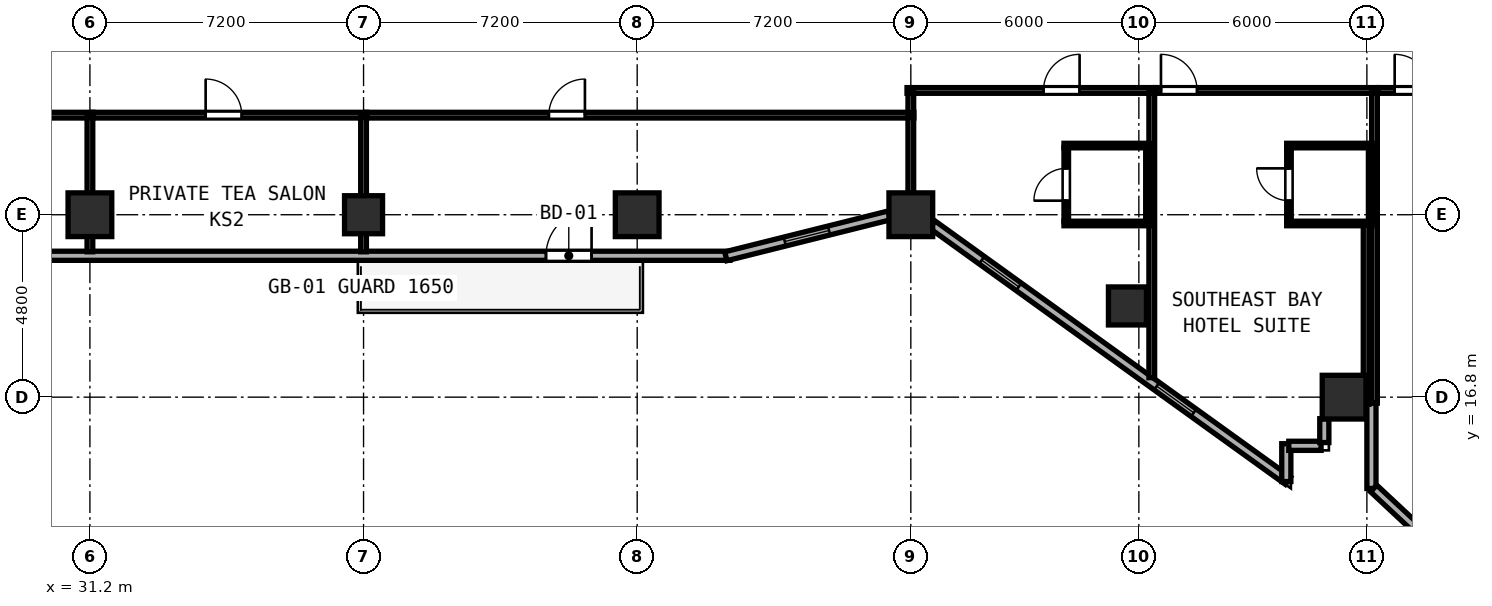
"""IFC4 building model, lengths in metres.
Left out: names, types, materials, properties, quantities, classifications, styles, units other than length and angle.
Written with IfcOpenShell. Run it as: python <this file> out.ifc"""

import sys

from ifc_helpers import new_model, si_unit, direction, frame, frame_2d, origin, origin_2d, place, context, subcontext, project, spatial, rectangle, hollow_rectangle, extrude, element, fill, save


model = new_model("IFC4")
c1 = context("Model", 3, precision=1e-05, world=origin(), true_north=direction((0.0, 1.0)))
c2 = subcontext(c1, "Body", "Model", "MODEL_VIEW")
j1 = project(units=[si_unit("LENGTHUNIT", "METRE"), si_unit("PLANEANGLEUNIT", "RADIAN")], contexts=[c1])
p1 = place(None, origin())
s1 = spatial("IfcSite", under=j1, at=p1, CompositionType="ELEMENT")
p2 = place(p1, origin())
s2 = spatial("IfcBuilding", under=s1, at=p2, CompositionType="ELEMENT")
p3 = place(p2, frame((0.0, 0.0, 70.4)))
s3 = spatial("IfcBuildingStorey", under=s2, at=p3, CompositionType="ELEMENT", Elevation=70.4)
for number, where, z_axis, x_axis in (
    (1, (52.8, 21.6, 0.0), (0.0, 0.0, 1.0), (1.0, 0.0, 0.0)),
    (2, (31.2, 21.6, 0.0), (0.0, 0.0, 1.0), (1.0, 0.0, 0.0)),
    (3, (45.6, 21.6, 0.0), (0.0, 0.0, 1.0), (1.0, 0.0, 0.0)),
    (4, (64.2, 16.8, 0.0), (0.0, 0.0, 1.0), (1.0, 0.0, 0.0)),
):
    element("IfcColumn", number, at=place(p3, frame(where, z_axis=z_axis, x_axis=x_axis)), inside=s3, PredefinedType="COLUMN", context=c2, shape_type="SweptSolid", body=[
        extrude(hollow_rectangle(XDim=1.15, YDim=1.15, WallThickness=0.042, at=origin_2d()), origin(), (0.0, 0.0, 1.0), 3.8),
    ])
for number, where, z_axis, x_axis in (
    (5, (38.4, 21.6, 0.0), (0.0, 0.0, 1.0), (1.0, 0.0, 0.0)),
    (6, (58.5, 19.2, 0.0), (0.0, 0.0, 1.0), (1.0, 0.0, 0.0)),
):
    element("IfcColumn", number, at=place(p3, frame(where, z_axis=z_axis, x_axis=x_axis)), inside=s3, PredefinedType="COLUMN", context=c2, shape_type="SweptSolid", body=[
        extrude(hollow_rectangle(XDim=1.0, YDim=1.0, WallThickness=0.038, at=origin_2d()), origin(), (0.0, 0.0, 1.0), 3.8),
    ])
p4 = place(p3, frame((28.76, 20.52, 0.0), z_axis=(0.0, 0.0, 1.0), x_axis=(1.0, 0.0, 0.0)))
e7 = element("IfcWall", 7, at=p4, inside=s3, PredefinedType="SOLIDWALL", context=c2, shape_type="SweptSolid", body=[
    extrude(rectangle(XDim=19.281, YDim=0.24, at=frame_2d((9.64, 0.0))), origin(), (0.0, 0.0, 1.0), 3.6),
])
p5 = place(p4, frame((15.64, 0.0, 0.0), z_axis=(0.0, 0.0, 1.0), x_axis=(-1.0, 0.0, 0.0)))
e8 = element("IfcOpeningElement", 8, at=p5, cuts=e7, PredefinedType="OPENING", context=c2, shape_type="SweptSolid", body=[
    extrude(rectangle(XDim=1.2, YDim=2.15, at=frame_2d((0.6, 1.075))), frame((0.0, 0.13, 0.0), z_axis=(0.0, -1.0, 0.0), x_axis=(1.0, 0.0, 0.0)), (0.0, 0.0, 1.0), 0.26),
])
p6 = place(p3, frame((47.932, 20.507, 0.0), z_axis=(0.0, 0.0, 1.0), x_axis=(0.970145739396, 0.242522667667, 0.0)))
e9 = element("IfcWall", 9, at=p6, inside=s3, PredefinedType="SOLIDWALL", context=c2, shape_type="SweptSolid", body=[
    extrude(rectangle(XDim=4.433, YDim=0.24, at=frame_2d((2.217, 0.0))), origin(), (0.0, 0.0, 1.0), 3.097),
])
p7 = place(p6, frame((1.6, 0.0, 0.85)))
e10 = element("IfcOpeningElement", 10, at=p7, cuts=e9, PredefinedType="OPENING", context=c2, shape_type="SweptSolid", body=[
    extrude(rectangle(XDim=1.2, YDim=1.85, at=frame_2d((0.6, 0.925))), frame((0.0, 0.13, 0.0), z_axis=(0.0, -1.0, 0.0), x_axis=(1.0, 0.0, 0.0)), (0.0, 0.0, 1.0), 0.26),
])
p8 = place(p3, frame((53.367, 21.34, 0.0), z_axis=(0.0, 0.0, 1.0), x_axis=(0.811543176492, -0.58429245476, 0.0)))
e11 = element("IfcWall", 11, at=p8, inside=s3, PredefinedType="SOLIDWALL", context=c2, shape_type="SweptSolid", body=[
    extrude(rectangle(XDim=11.531, YDim=0.24, at=frame_2d((5.765, 0.0))), origin(), (0.0, 0.0, 1.0), 3.097),
])
p9 = place(p8, frame((1.6, 0.0, 0.85)))
e12 = element("IfcOpeningElement", 12, at=p9, cuts=e11, PredefinedType="OPENING", context=c2, shape_type="SweptSolid", body=[
    extrude(rectangle(XDim=1.2, YDim=1.85, at=frame_2d((0.6, 0.925))), frame((0.0, 0.13, 0.0), z_axis=(0.0, -1.0, 0.0), x_axis=(1.0, 0.0, 0.0)), (0.0, 0.0, 1.0), 0.26),
])
p10 = place(p8, frame((7.273, 0.0, 0.85)))
e13 = element("IfcOpeningElement", 13, at=p10, cuts=e11, PredefinedType="OPENING", context=c2, shape_type="SweptSolid", body=[
    extrude(rectangle(XDim=1.2, YDim=1.85, at=frame_2d((0.6, 0.925))), frame((0.0, 0.13, 0.0), z_axis=(0.0, -1.0, 0.0), x_axis=(1.0, 0.0, 0.0)), (0.0, 0.0, 1.0), 0.26),
])
p11 = place(p3, frame((62.68, 14.579, 0.0), z_axis=(0.0, 0.0, 1.0), x_axis=(0.0, 1.0, 0.0)))
e14 = element("IfcWall", 14, at=p11, inside=s3, PredefinedType="SOLIDWALL", context=c2, shape_type="SweptSolid", body=[
    extrude(rectangle(XDim=0.996, YDim=0.24, at=frame_2d((0.498, 0.0))), origin(), (0.0, 0.0, 1.0), 3.6),
])
p12 = place(p3, frame((62.745, 15.52, 0.0), z_axis=(0.0, 0.0, 1.0), x_axis=(1.0, 0.0, 0.0)))
e15 = element("IfcWall", 15, at=p12, inside=s3, PredefinedType="SOLIDWALL", context=c2, shape_type="SweptSolid", body=[
    extrude(rectangle(XDim=0.85, YDim=0.24, at=frame_2d((0.425, 0.0))), origin(), (0.0, 0.0, 1.0), 3.6),
])
p13 = place(p3, frame((63.68, 15.605, 0.0), z_axis=(0.0, 0.0, 1.0), x_axis=(0.0, 1.0, 0.0)))
e16 = element("IfcWall", 16, at=p13, inside=s3, PredefinedType="SOLIDWALL", context=c2, shape_type="SweptSolid", body=[
    extrude(rectangle(XDim=0.628, YDim=0.24, at=frame_2d((0.314, 0.0))), origin(), (0.0, 0.0, 1.0), 3.6),
])
p14 = place(p3, frame((64.92, 16.64, 0.0), z_axis=(0.0, 0.0, 1.0), x_axis=(0.0, -1.0, 0.0)))
e17 = element("IfcWall", 17, at=p14, inside=s3, PredefinedType="SOLIDWALL", context=c2, shape_type="SweptSolid", body=[
    extrude(rectangle(XDim=2.243, YDim=0.24, at=frame_2d((1.121, 0.0))), origin(), (0.0, 0.0, 1.0), 3.6),
])
p15 = place(p3, frame((64.979, 14.397, 0.0), z_axis=(0.0, 0.0, 1.0), x_axis=(0.731053894258, -0.682319722484, 0.0)))
e18 = element("IfcWall", 18, at=p15, inside=s3, PredefinedType="SOLIDWALL", context=c2, shape_type="SweptSolid", body=[
    extrude(rectangle(XDim=11.818, YDim=0.24, at=frame_2d((5.909, 0.0))), origin(), (0.0, 0.0, 1.0), 3.6),
])
p16 = place(p15, frame((1.6, 0.0, 0.85)))
e19 = element("IfcOpeningElement", 19, at=p16, cuts=e18, PredefinedType="OPENING", context=c2, shape_type="SweptSolid", body=[
    extrude(rectangle(XDim=1.2, YDim=1.85, at=frame_2d((0.6, 0.925))), frame((0.0, 0.13, 0.0), z_axis=(0.0, -1.0, 0.0), x_axis=(1.0, 0.0, 0.0)), (0.0, 0.0, 1.0), 0.26),
])
p17 = place(p15, frame((7.0, 0.0, 0.85)))
e20 = element("IfcOpeningElement", 20, at=p17, cuts=e18, PredefinedType="OPENING", context=c2, shape_type="SweptSolid", body=[
    extrude(rectangle(XDim=1.2, YDim=1.85, at=frame_2d((0.6, 0.925))), frame((0.0, 0.13, 0.0), z_axis=(0.0, -1.0, 0.0), x_axis=(1.0, 0.0, 0.0)), (0.0, 0.0, 1.0), 0.26),
])
p18 = place(p3, frame((23.92, 24.22, 0.0), z_axis=(0.0, 0.0, 1.0), x_axis=(1.0, 0.0, 0.0)))
e21 = element("IfcWall", 21, at=p18, inside=s3, PredefinedType="PARTITIONING", context=c2, shape_type="SweptSolid", body=[
    extrude(rectangle(XDim=7.36, YDim=0.15, at=frame_2d((3.68, 0.0))), origin(), (0.0, 0.0, 1.0), 3.6),
])
p19 = place(p18, frame((5.845, 0.0, 0.0), z_axis=(0.0, 0.0, 1.0), x_axis=(-1.0, 0.0, 0.0)))
e22 = element("IfcOpeningElement", 22, at=p19, cuts=e21, PredefinedType="OPENING", context=c2, shape_type="SweptSolid", body=[
    extrude(rectangle(XDim=0.95, YDim=2.12, at=frame_2d((0.475, 1.06))), frame((0.0, 0.085, 0.0), z_axis=(0.0, -1.0, 0.0), x_axis=(1.0, 0.0, 0.0)), (0.0, 0.0, 1.0), 0.17),
])
p20 = place(p3, frame((31.2, 20.625, 0.0), z_axis=(0.0, 0.0, 1.0), x_axis=(0.0, 1.0, 0.0)))
e23 = element("IfcWall", 23, at=p20, inside=s3, PredefinedType="PARTITIONING", context=c2, shape_type="SweptSolid", body=[
    extrude(rectangle(XDim=3.535, YDim=0.15, at=frame_2d((1.768, 0.0))), origin(), (0.0, 0.0, 1.0), 2.985),
])
p21 = place(p3, frame((31.282, 24.22, 0.0), z_axis=(0.0, 0.0, 1.0), x_axis=(1.0, 0.0, 0.0)))
e24 = element("IfcWall", 24, at=p21, inside=s3, PredefinedType="PARTITIONING", context=c2, shape_type="SweptSolid", body=[
    extrude(rectangle(XDim=7.198, YDim=0.15, at=frame_2d((3.599, 0.0))), origin(), (0.0, 0.0, 1.0), 3.6),
])
p22 = place(p21, frame((3.913, 0.0, 0.0), z_axis=(0.0, 0.0, 1.0), x_axis=(-1.0, 0.0, 0.0)))
e25 = element("IfcOpeningElement", 25, at=p22, cuts=e24, PredefinedType="OPENING", context=c2, shape_type="SweptSolid", body=[
    extrude(rectangle(XDim=0.95, YDim=2.12, at=frame_2d((0.475, 1.06))), frame((0.0, 0.085, 0.0), z_axis=(0.0, -1.0, 0.0), x_axis=(1.0, 0.0, 0.0)), (0.0, 0.0, 1.0), 0.17),
])
p23 = place(p3, frame((38.4, 20.625, 0.0), z_axis=(0.0, 0.0, 1.0), x_axis=(0.0, 1.0, 0.0)))
e26 = element("IfcWall", 26, at=p23, inside=s3, PredefinedType="PARTITIONING", context=c2, shape_type="SweptSolid", body=[
    extrude(rectangle(XDim=3.535, YDim=0.15, at=frame_2d((1.768, 0.0))), origin(), (0.0, 0.0, 1.0), 2.985),
])
p24 = place(p3, frame((38.482, 24.22, 0.0), z_axis=(0.0, 0.0, 1.0), x_axis=(1.0, 0.0, 0.0)))
e27 = element("IfcWall", 27, at=p24, inside=s3, PredefinedType="PARTITIONING", context=c2, shape_type="SweptSolid", body=[
    extrude(rectangle(XDim=14.398, YDim=0.15, at=frame_2d((7.199, 0.0))), origin(), (0.0, 0.0, 1.0), 3.6),
])
p25 = place(p24, frame((5.743, 0.0, 0.0), z_axis=(0.0, 0.0, 1.0), x_axis=(-1.0, 0.0, 0.0)))
e28 = element("IfcOpeningElement", 28, at=p25, cuts=e27, PredefinedType="OPENING", context=c2, shape_type="SweptSolid", body=[
    extrude(rectangle(XDim=0.95, YDim=2.12, at=frame_2d((0.475, 1.06))), frame((0.0, 0.085, 0.0), z_axis=(0.0, -1.0, 0.0), x_axis=(1.0, 0.0, 0.0)), (0.0, 0.0, 1.0), 0.17),
])
p26 = place(p3, frame((52.8, 21.819, 0.0), z_axis=(0.0, 0.0, 1.0), x_axis=(0.0, 1.0, 0.0)))
e29 = element("IfcWall", 29, at=p26, inside=s3, PredefinedType="PARTITIONING", context=c2, shape_type="SweptSolid", body=[
    extrude(rectangle(XDim=2.341, YDim=0.15, at=frame_2d((1.171, 0.0))), origin(), (0.0, 0.0, 1.0), 3.097),
])
p27 = place(p3, frame((52.7, 24.87, 0.0), z_axis=(0.0, 0.0, 1.0), x_axis=(1.0, 0.0, 0.0)))
e30 = element("IfcWall", 30, at=p27, inside=s3, PredefinedType="PARTITIONING", context=c2, shape_type="SweptSolid", body=[
    extrude(rectangle(XDim=6.54, YDim=0.15, at=frame_2d((3.27, 0.0))), origin(), (0.0, 0.0, 1.0), 3.185),
])
p28 = place(p27, frame((4.541, 0.0, 0.0), z_axis=(0.0, 0.0, 1.0), x_axis=(-1.0, 0.0, 0.0)))
e31 = element("IfcOpeningElement", 31, at=p28, cuts=e30, PredefinedType="OPENING", context=c2, shape_type="SweptSolid", body=[
    extrude(rectangle(XDim=0.95, YDim=2.18, at=frame_2d((0.475, 1.09))), frame((0.0, 0.085, 0.0), z_axis=(0.0, -1.0, 0.0), x_axis=(1.0, 0.0, 0.0)), (0.0, 0.0, 1.0), 0.17),
])
p29 = place(p3, frame((52.8, 24.28, 0.0), z_axis=(0.0, 0.0, 1.0), x_axis=(0.0, 1.0, 0.0)))
e32 = element("IfcWall", 32, at=p29, inside=s3, PredefinedType="PARTITIONING", context=c2, shape_type="SweptSolid", body=[
    extrude(rectangle(XDim=0.53, YDim=0.15, at=frame_2d((0.265, 0.0))), origin(), (0.0, 0.0, 1.0), 3.097),
])
p30 = place(p3, frame((59.14, 17.312, 0.0), z_axis=(0.0, 0.0, 1.0), x_axis=(0.0, 1.0, 0.0)))
e33 = element("IfcWall", 33, at=p30, inside=s3, PredefinedType="PARTITIONING", context=c2, shape_type="SweptSolid", body=[
    extrude(rectangle(XDim=7.498, YDim=0.15, at=frame_2d((3.749, 0.0))), origin(), (0.0, 0.0, 1.0), 3.6),
])
for number, where, z_axis, x_axis in (
    (34, (56.83, 23.42, 0.0), (0.0, 0.0, 1.0), (1.0, 0.0, 0.0)),
    (35, (56.83, 21.37, 0.0), (0.0, 0.0, 1.0), (1.0, 0.0, 0.0)),
):
    element("IfcWall", number, at=place(p3, frame(where, z_axis=z_axis, x_axis=x_axis)), inside=s3, PredefinedType="PARTITIONING", context=c2, shape_type="SweptSolid", body=[
        extrude(rectangle(XDim=2.25, YDim=0.12, at=frame_2d((1.125, 0.0))), origin(), (0.0, 0.0, 1.0), 3.6),
    ])
p31 = place(p3, frame((56.89, 21.415, 0.0), z_axis=(0.0, 0.0, 1.0), x_axis=(0.0, 1.0, 0.0)))
e36 = element("IfcWall", 36, at=p31, inside=s3, PredefinedType="PARTITIONING", context=c2, shape_type="SweptSolid", body=[
    extrude(rectangle(XDim=1.96, YDim=0.12, at=frame_2d((0.98, 0.0))), origin(), (0.0, 0.0, 1.0), 3.6),
])
p32 = place(p31, frame((1.405, 0.0, 0.0), z_axis=(0.0, 0.0, 1.0), x_axis=(-1.0, 0.0, 0.0)))
e37 = element("IfcOpeningElement", 37, at=p32, cuts=e36, PredefinedType="OPENING", context=c2, shape_type="SweptSolid", body=[
    extrude(rectangle(XDim=0.85, YDim=2.1, at=frame_2d((0.425, 1.05))), frame((0.0, 0.07, 0.0), z_axis=(0.0, -1.0, 0.0), x_axis=(1.0, 0.0, 0.0)), (0.0, 0.0, 1.0), 0.14),
])
p33 = place(p3, frame((59.04, 21.415, 0.0), z_axis=(0.0, 0.0, 1.0), x_axis=(0.0, 1.0, 0.0)))
e38 = element("IfcWall", 38, at=p33, inside=s3, PredefinedType="PARTITIONING", context=c2, shape_type="SweptSolid", body=[
    extrude(rectangle(XDim=1.96, YDim=0.12, at=frame_2d((0.98, 0.0))), origin(), (0.0, 0.0, 1.0), 3.6),
])
p34 = place(p3, frame((59.242, 24.87, 0.0), z_axis=(0.0, 0.0, 1.0), x_axis=(1.0, 0.0, 0.0)))
e39 = element("IfcWall", 39, at=p34, inside=s3, PredefinedType="PARTITIONING", context=c2, shape_type="SweptSolid", body=[
    extrude(rectangle(XDim=5.858, YDim=0.15, at=frame_2d((2.929, 0.0))), origin(), (0.0, 0.0, 1.0), 3.185),
])
p35 = place(p34, frame((1.09, 0.0, 0.0), z_axis=(0.0, 0.0, 1.0), x_axis=(-1.0, 0.0, 0.0)))
e40 = element("IfcOpeningElement", 40, at=p35, cuts=e39, PredefinedType="OPENING", context=c2, shape_type="SweptSolid", body=[
    extrude(rectangle(XDim=0.95, YDim=2.18, at=frame_2d((0.475, 1.09))), frame((0.0, 0.085, 0.0), z_axis=(0.0, -1.0, 0.0), x_axis=(1.0, 0.0, 0.0)), (0.0, 0.0, 1.0), 0.17),
])
p36 = place(p3, frame((65.0, 16.642, 0.0), z_axis=(0.0, 0.0, 1.0), x_axis=(0.0, 1.0, 0.0)))
e41 = element("IfcWall", 41, at=p36, inside=s3, PredefinedType="PARTITIONING", context=c2, shape_type="SweptSolid", body=[
    extrude(rectangle(XDim=8.168, YDim=0.15, at=frame_2d((4.084, 0.0))), origin(), (0.0, 0.0, 1.0), 3.6),
])
for number, where, z_axis, x_axis in (
    (42, (62.69, 23.42, 0.0), (0.0, 0.0, 1.0), (1.0, 0.0, 0.0)),
    (43, (62.69, 21.37, 0.0), (0.0, 0.0, 1.0), (1.0, 0.0, 0.0)),
):
    element("IfcWall", number, at=place(p3, frame(where, z_axis=z_axis, x_axis=x_axis)), inside=s3, PredefinedType="PARTITIONING", context=c2, shape_type="SweptSolid", body=[
        extrude(rectangle(XDim=2.25, YDim=0.12, at=frame_2d((1.125, 0.0))), origin(), (0.0, 0.0, 1.0), 3.6),
    ])
p37 = place(p3, frame((62.75, 21.415, 0.0), z_axis=(0.0, 0.0, 1.0), x_axis=(0.0, 1.0, 0.0)))
e44 = element("IfcWall", 44, at=p37, inside=s3, PredefinedType="PARTITIONING", context=c2, shape_type="SweptSolid", body=[
    extrude(rectangle(XDim=1.96, YDim=0.12, at=frame_2d((0.98, 0.0))), origin(), (0.0, 0.0, 1.0), 3.6),
])
p38 = place(p37, frame((1.405, 0.0, 0.0), z_axis=(0.0, 0.0, 1.0), x_axis=(-1.0, 0.0, 0.0)))
e45 = element("IfcOpeningElement", 45, at=p38, cuts=e44, PredefinedType="OPENING", context=c2, shape_type="SweptSolid", body=[
    extrude(rectangle(XDim=0.85, YDim=2.1, at=frame_2d((0.425, 1.05))), frame((0.0, 0.07, 0.0), z_axis=(0.0, -1.0, 0.0), x_axis=(1.0, 0.0, 0.0)), (0.0, 0.0, 1.0), 0.14),
])
p39 = place(p3, frame((64.9, 21.415, 0.0), z_axis=(0.0, 0.0, 1.0), x_axis=(0.0, 1.0, 0.0)))
e46 = element("IfcWall", 46, at=p39, inside=s3, PredefinedType="PARTITIONING", context=c2, shape_type="SweptSolid", body=[
    extrude(rectangle(XDim=1.96, YDim=0.12, at=frame_2d((0.98, 0.0))), origin(), (0.0, 0.0, 1.0), 3.6),
])
p40 = place(p3, frame((65.102, 24.87, 0.0), z_axis=(0.0, 0.0, 1.0), x_axis=(1.0, 0.0, 0.0)))
e47 = element("IfcWall", 47, at=p40, inside=s3, PredefinedType="PARTITIONING", context=c2, shape_type="SweptSolid", body=[
    extrude(rectangle(XDim=10.273, YDim=0.15, at=frame_2d((5.136, 0.0))), origin(), (0.0, 0.0, 1.0), 3.6),
])
p41 = place(p40, frame((1.379, 0.0, 0.0), z_axis=(0.0, 0.0, 1.0), x_axis=(-1.0, 0.0, 0.0)))
e48 = element("IfcOpeningElement", 48, at=p41, cuts=e47, PredefinedType="OPENING", context=c2, shape_type="SweptSolid", body=[
    extrude(rectangle(XDim=0.95, YDim=2.18, at=frame_2d((0.475, 1.09))), frame((0.0, 0.085, 0.0), z_axis=(0.0, -1.0, 0.0), x_axis=(1.0, 0.0, 0.0)), (0.0, 0.0, 1.0), 0.17),
])
p42 = place(p3, frame((64.78, 16.612, 0.0), z_axis=(0.0, 0.0, 1.0), x_axis=(0.0, 1.0, 0.0)))
e49 = element("IfcWall", 49, at=p42, inside=s3, PredefinedType="PARTITIONING", context=c2, shape_type="SweptSolid", body=[
    extrude(rectangle(XDim=4.713, YDim=0.15, at=frame_2d((2.356, 0.0))), origin(), (0.0, 0.0, 1.0), 3.6),
])
p43 = place(p7, origin())
e50 = element("IfcWindow", 50, at=p43, inside=s3, PartitioningType="SINGLE_PANEL", PredefinedType="WINDOW", context=c2, shape_type="SweptSolid", body=[
    extrude(rectangle(XDim=1.2, YDim=1.85, at=frame_2d((0.6, 0.925))), frame((0.0, 0.03, 0.0), z_axis=(0.0, -1.0, 0.0), x_axis=(1.0, 0.0, 0.0)), (0.0, 0.0, 1.0), 0.06),
])
fill(e10, e50)
p44 = place(p9, origin())
e51 = element("IfcWindow", 51, at=p44, inside=s3, PartitioningType="SINGLE_PANEL", PredefinedType="WINDOW", context=c2, shape_type="SweptSolid", body=[
    extrude(rectangle(XDim=1.2, YDim=1.85, at=frame_2d((0.6, 0.925))), frame((0.0, 0.03, 0.0), z_axis=(0.0, -1.0, 0.0), x_axis=(1.0, 0.0, 0.0)), (0.0, 0.0, 1.0), 0.06),
])
fill(e12, e51)
p45 = place(p10, origin())
e52 = element("IfcWindow", 52, at=p45, inside=s3, PartitioningType="SINGLE_PANEL", PredefinedType="WINDOW", context=c2, shape_type="SweptSolid", body=[
    extrude(rectangle(XDim=1.2, YDim=1.85, at=frame_2d((0.6, 0.925))), frame((0.0, 0.03, 0.0), z_axis=(0.0, -1.0, 0.0), x_axis=(1.0, 0.0, 0.0)), (0.0, 0.0, 1.0), 0.06),
])
fill(e13, e52)
p46 = place(p5, origin())
e53 = element("IfcDoor", 53, at=p46, inside=s3, OperationType="SINGLE_SWING_LEFT", PredefinedType="DOOR", context=c2, shape_type="SweptSolid", body=[
    extrude(rectangle(XDim=1.2, YDim=2.15, at=frame_2d((0.6, 1.075))), frame((0.0, 0.025, 0.0), z_axis=(0.0, -1.0, 0.0), x_axis=(1.0, 0.0, 0.0)), (0.0, 0.0, 1.0), 0.05),
])
fill(e8, e53)
p47 = place(p22, origin())
e54 = element("IfcDoor", 54, at=p47, inside=s3, OperationType="SINGLE_SWING_RIGHT", PredefinedType="DOOR", context=c2, shape_type="SweptSolid", body=[
    extrude(rectangle(XDim=0.95, YDim=2.12, at=frame_2d((0.475, 1.06))), frame((0.0, 0.025, 0.0), z_axis=(0.0, -1.0, 0.0), x_axis=(1.0, 0.0, 0.0)), (0.0, 0.0, 1.0), 0.05),
])
fill(e25, e54)
p48 = place(p25, origin())
e55 = element("IfcDoor", 55, at=p48, inside=s3, OperationType="SINGLE_SWING_LEFT", PredefinedType="DOOR", context=c2, shape_type="SweptSolid", body=[
    extrude(rectangle(XDim=0.95, YDim=2.12, at=frame_2d((0.475, 1.06))), frame((0.0, 0.025, 0.0), z_axis=(0.0, -1.0, 0.0), x_axis=(1.0, 0.0, 0.0)), (0.0, 0.0, 1.0), 0.05),
])
fill(e28, e55)
p49 = place(p28, origin())
e56 = element("IfcDoor", 56, at=p49, inside=s3, OperationType="SINGLE_SWING_LEFT", PredefinedType="DOOR", context=c2, shape_type="SweptSolid", body=[
    extrude(rectangle(XDim=0.95, YDim=2.18, at=frame_2d((0.475, 1.09))), frame((0.0, 0.025, 0.0), z_axis=(0.0, -1.0, 0.0), x_axis=(1.0, 0.0, 0.0)), (0.0, 0.0, 1.0), 0.05),
])
fill(e31, e56)
p50 = place(p32, origin())
e57 = element("IfcDoor", 57, at=p50, inside=s3, OperationType="SINGLE_SWING_RIGHT", PredefinedType="DOOR", context=c2, shape_type="SweptSolid", body=[
    extrude(rectangle(XDim=0.85, YDim=2.1, at=frame_2d((0.425, 1.05))), frame((0.0, 0.025, 0.0), z_axis=(0.0, -1.0, 0.0), x_axis=(1.0, 0.0, 0.0)), (0.0, 0.0, 1.0), 0.05),
])
fill(e37, e57)
p51 = place(p35, origin())
e58 = element("IfcDoor", 58, at=p51, inside=s3, OperationType="SINGLE_SWING_RIGHT", PredefinedType="DOOR", context=c2, shape_type="SweptSolid", body=[
    extrude(rectangle(XDim=0.95, YDim=2.18, at=frame_2d((0.475, 1.09))), frame((0.0, 0.025, 0.0), z_axis=(0.0, -1.0, 0.0), x_axis=(1.0, 0.0, 0.0)), (0.0, 0.0, 1.0), 0.05),
])
fill(e40, e58)
p52 = place(p38, origin())
e59 = element("IfcDoor", 59, at=p52, inside=s3, OperationType="SINGLE_SWING_LEFT", PredefinedType="DOOR", context=c2, shape_type="SweptSolid", body=[
    extrude(rectangle(XDim=0.85, YDim=2.1, at=frame_2d((0.425, 1.05))), frame((0.0, 0.025, 0.0), z_axis=(0.0, -1.0, 0.0), x_axis=(1.0, 0.0, 0.0)), (0.0, 0.0, 1.0), 0.05),
])
fill(e45, e59)
p53 = place(p41, origin())
e60 = element("IfcDoor", 60, at=p53, inside=s3, OperationType="SINGLE_SWING_RIGHT", PredefinedType="DOOR", context=c2, shape_type="SweptSolid", body=[
    extrude(rectangle(XDim=0.95, YDim=2.18, at=frame_2d((0.475, 1.09))), frame((0.0, 0.025, 0.0), z_axis=(0.0, -1.0, 0.0), x_axis=(1.0, 0.0, 0.0)), (0.0, 0.0, 1.0), 0.05),
])
fill(e48, e60)
save(model, sys.argv[1])
